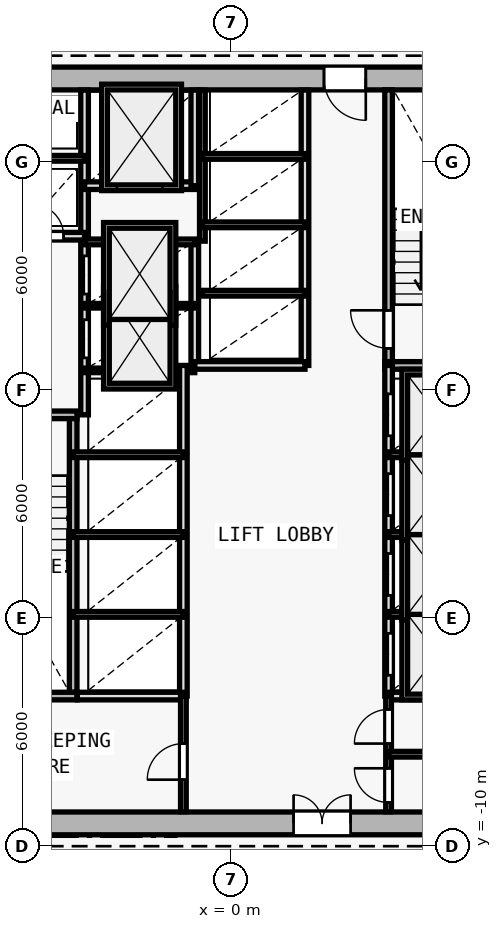
"""IFC4 building model, lengths in metres.
Left out: names, types, materials, properties, quantities, classifications, styles, units other than length and angle.
Written with IfcOpenShell. Run it as: python <this file> out.ifc"""

import sys

from ifc_helpers import new_model, si_unit, direction, frame, frame_2d, origin, origin_2d, place, context, subcontext, project, spatial, rectangle, i_section, extrude, element, fill, save


model = new_model("IFC4")
c1 = context("Model", 3, precision=1e-05, world=origin(), true_north=direction((0.0, 1.0)))
c2 = subcontext(c1, "Body", "Model", "MODEL_VIEW")
j1 = project(units=[si_unit("LENGTHUNIT", "METRE"), si_unit("PLANEANGLEUNIT", "RADIAN")], contexts=[c1])
p1 = place(None, origin())
s1 = spatial("IfcSite", under=j1, at=p1, CompositionType="ELEMENT")
p2 = place(p1, origin())
s2 = spatial("IfcBuilding", under=s1, at=p2, CompositionType="ELEMENT")
p3 = place(p2, frame((0.0, 0.0, 55.2)))
s3 = spatial("IfcBuildingStorey", under=s2, at=p3, CompositionType="ELEMENT", Elevation=55.2)
p4 = place(p3, frame((0.0, -9.4, 0.0), z_axis=(0.0, 0.0, 1.0), x_axis=(1.0, 0.0, 0.0)))
e1 = element("IfcColumn", 1, at=p4, inside=s3, PredefinedType="COLUMN", context=c2, shape_type="SweptSolid", body=[
    extrude(i_section(OverallWidth=0.416, OverallDepth=0.446, WebThickness=0.025, FlangeThickness=0.04, FilletRadius=0.015, at=origin_2d()), origin(), (0.0, 0.0, 1.0), 3.6),
])
p5 = place(p3, frame((-8.0, -9.4, 0.0), z_axis=(0.0, 0.0, 1.0), x_axis=(1.0, 0.0, 0.0)))
e2 = element("IfcWall", 2, at=p5, inside=s3, PredefinedType="SHEAR", context=c2, shape_type="SweptSolid", body=[
    extrude(rectangle(XDim=16.0, YDim=0.6, at=frame_2d((8.0, 0.0))), origin(), (0.0, 0.0, 1.0), 3.35),
])
p6 = place(p5, frame((9.65, 0.0, 0.0)))
e3 = element("IfcOpeningElement", 3, at=p6, cuts=e2, PredefinedType="OPENING", context=c2, shape_type="SweptSolid", body=[
    extrude(rectangle(XDim=1.5, YDim=2.2, at=frame_2d((0.75, 1.1))), frame((0.0, 0.31, 0.0), z_axis=(0.0, -1.0, 0.0), x_axis=(1.0, 0.0, 0.0)), (0.0, 0.0, 1.0), 0.62),
])
p7 = place(p3, frame((8.0, 10.2, 0.0), z_axis=(0.0, 0.0, 1.0), x_axis=(-1.0, 0.0, 0.0)))
e4 = element("IfcWall", 4, at=p7, inside=s3, PredefinedType="SHEAR", context=c2, shape_type="SweptSolid", body=[
    extrude(rectangle(XDim=16.0, YDim=0.6, at=frame_2d((8.0, 0.0))), origin(), (0.0, 0.0, 1.0), 3.35),
])
p8 = place(p7, frame((4.45, 0.0, 0.0)))
e5 = element("IfcOpeningElement", 5, at=p8, cuts=e4, PredefinedType="OPENING", context=c2, shape_type="SweptSolid", body=[
    extrude(rectangle(XDim=1.1, YDim=2.15, at=frame_2d((0.55, 1.075))), frame((0.0, 0.31, 0.0), z_axis=(0.0, -1.0, 0.0), x_axis=(1.0, 0.0, 0.0)), (0.0, 0.0, 1.0), 0.62),
])
p9 = place(p3, frame((-7.4, 1.35, 0.0), z_axis=(0.0, 0.0, 1.0), x_axis=(1.0, 0.0, 0.0)))
e6 = element("IfcWall", 6, at=p9, inside=s3, PredefinedType="SOLIDWALL", context=c2, shape_type="SweptSolid", body=[
    extrude(rectangle(XDim=3.35, YDim=0.2, at=frame_2d((1.675, 0.0))), origin(), (0.0, 0.0, 1.0), 3.35),
])
p10 = place(p9, frame((0.65, 0.0, 0.0)))
e7 = element("IfcOpeningElement", 7, at=p10, cuts=e6, PredefinedType="OPENING", context=c2, shape_type="SweptSolid", body=[
    extrude(rectangle(XDim=1.0, YDim=2.15, at=frame_2d((0.5, 1.075))), frame((0.0, 0.11, 0.0), z_axis=(0.0, -1.0, 0.0), x_axis=(1.0, 0.0, 0.0)), (0.0, 0.0, 1.0), 0.22),
])
p11 = place(p3, frame((-4.15, -5.95, 0.0), z_axis=(0.0, 0.0, 1.0), x_axis=(0.0, 1.0, 0.0)))
e8 = element("IfcWall", 8, at=p11, inside=s3, PredefinedType="SOLIDWALL", context=c2, shape_type="SweptSolid", body=[
    extrude(rectangle(XDim=7.2, YDim=0.2, at=frame_2d((3.6, 0.0))), origin(), (0.0, 0.0, 1.0), 3.35),
])
p12 = place(p3, frame((-3.85, 1.35, 0.0), z_axis=(0.0, 0.0, 1.0), x_axis=(0.0, 1.0, 0.0)))
e9 = element("IfcWall", 9, at=p12, inside=s3, PredefinedType="SOLIDWALL", context=c2, shape_type="SweptSolid", body=[
    extrude(rectangle(XDim=8.545, YDim=0.2, at=frame_2d((4.272, 0.0))), origin(), (0.0, 0.0, 1.0), 3.35),
])
p13 = place(p12, frame((1.5, 0.0, 0.0)))
e10 = element("IfcOpeningElement", 10, at=p13, cuts=e9, PredefinedType="OPENING", context=c2, shape_type="SweptSolid", body=[
    extrude(rectangle(XDim=1.0, YDim=2.15, at=frame_2d((0.5, 1.075))), frame((0.0, 0.11, 0.0), z_axis=(0.0, -1.0, 0.0), x_axis=(1.0, 0.0, 0.0)), (0.0, 0.0, 1.0), 0.22),
])
p14 = place(p12, frame((3.18, 0.0, 0.0)))
e11 = element("IfcOpeningElement", 11, at=p14, cuts=e9, PredefinedType="OPENING", context=c2, shape_type="SweptSolid", body=[
    extrude(rectangle(XDim=1.0, YDim=2.15, at=frame_2d((0.5, 1.075))), frame((0.0, 0.11, 0.0), z_axis=(0.0, -1.0, 0.0), x_axis=(1.0, 0.0, 0.0)), (0.0, 0.0, 1.0), 0.22),
])
p15 = place(p3, frame((-7.395, 6.05, 0.0), z_axis=(0.0, 0.0, 1.0), x_axis=(1.0, 0.0, 0.0)))
e12 = element("IfcWall", 12, at=p15, inside=s3, PredefinedType="SOLIDWALL", context=c2, shape_type="SweptSolid", body=[
    extrude(rectangle(XDim=3.545, YDim=0.2, at=frame_2d((1.772, 0.0))), origin(), (0.0, 0.0, 1.0), 3.35),
])
p16 = place(p15, frame((0.345, 0.0, 0.0)))
e13 = element("IfcOpeningElement", 13, at=p16, cuts=e12, PredefinedType="OPENING", context=c2, shape_type="SweptSolid", body=[
    extrude(rectangle(XDim=0.85, YDim=2.1, at=frame_2d((0.425, 1.05))), frame((0.0, 0.11, 0.0), z_axis=(0.0, -1.0, 0.0), x_axis=(1.0, 0.0, 0.0)), (0.0, 0.0, 1.0), 0.22),
])
p17 = place(p15, frame((2.145, 0.0, 0.0)))
e14 = element("IfcOpeningElement", 14, at=p17, cuts=e12, PredefinedType="OPENING", context=c2, shape_type="SweptSolid", body=[
    extrude(rectangle(XDim=0.85, YDim=2.1, at=frame_2d((0.425, 1.05))), frame((0.0, 0.11, 0.0), z_axis=(0.0, -1.0, 0.0), x_axis=(1.0, 0.0, 0.0)), (0.0, 0.0, 1.0), 0.22),
])
p18 = place(p3, frame((-7.395, 8.1, 0.0), z_axis=(0.0, 0.0, 1.0), x_axis=(1.0, 0.0, 0.0)))
e15 = element("IfcWall", 15, at=p18, inside=s3, PredefinedType="PARTITIONING", context=c2, shape_type="SweptSolid", body=[
    extrude(rectangle(XDim=3.545, YDim=0.15, at=frame_2d((1.772, 0.0))), origin(), (0.0, 0.0, 1.0), 3.35),
])
p19 = place(p3, frame((4.15, 2.75, 0.0), z_axis=(0.0, 0.0, 1.0), x_axis=(0.0, 1.0, 0.0)))
e16 = element("IfcWall", 16, at=p19, inside=s3, PredefinedType="SOLIDWALL", context=c2, shape_type="SweptSolid", body=[
    extrude(rectangle(XDim=7.15, YDim=0.2, at=frame_2d((3.575, 0.0))), origin(), (0.0, 0.0, 1.0), 3.35),
])
p20 = place(p19, frame((0.35, 0.0, 0.0)))
e17 = element("IfcOpeningElement", 17, at=p20, cuts=e16, PredefinedType="OPENING", context=c2, shape_type="SweptSolid", body=[
    extrude(rectangle(XDim=1.0, YDim=2.15, at=frame_2d((0.5, 1.075))), frame((0.0, 0.11, 0.0), z_axis=(0.0, -1.0, 0.0), x_axis=(1.0, 0.0, 0.0)), (0.0, 0.0, 1.0), 0.22),
])
p21 = place(p3, frame((4.05, 2.65, 0.0), z_axis=(0.0, 0.0, 1.0), x_axis=(1.0, 0.0, 0.0)))
e18 = element("IfcWall", 18, at=p21, inside=s3, PredefinedType="SOLIDWALL", context=c2, shape_type="SweptSolid", body=[
    extrude(rectangle(XDim=3.35, YDim=0.2, at=frame_2d((1.675, 0.0))), origin(), (0.0, 0.0, 1.0), 3.35),
])
p22 = place(p3, frame((-0.95, 2.65, 0.0), z_axis=(0.0, 0.0, 1.0), x_axis=(0.0, 1.0, 0.0)))
e19 = element("IfcWall", 19, at=p22, inside=s3, PredefinedType="SOLIDWALL", context=c2, shape_type="SweptSolid", body=[
    extrude(rectangle(XDim=3.27, YDim=0.2, at=frame_2d((1.635, 0.0))), origin(), (0.0, 0.0, 1.0), 3.35),
])
for number, where, z_axis, x_axis in (
    (20, (-3.85, 2.52, 0.0), (0.0, 0.0, 1.0), (1.0, 0.0, 0.0)),
    (21, (-3.85, 4.22, 0.0), (0.0, 0.0, 1.0), (1.0, 0.0, 0.0)),
):
    element("IfcWall", number, at=place(p3, frame(where, z_axis=z_axis, x_axis=x_axis)), inside=s3, PredefinedType="PARTITIONING", context=c2, shape_type="SweptSolid", body=[
        extrude(rectangle(XDim=2.9, YDim=0.12, at=frame_2d((1.45, 0.0))), origin(), (0.0, 0.0, 1.0), 3.35),
    ])
p23 = place(p3, frame((-3.85, 5.9, 0.0), z_axis=(0.0, 0.0, 1.0), x_axis=(1.0, 0.0, 0.0)))
e22 = element("IfcWall", 22, at=p23, inside=s3, PredefinedType="PARTITIONING", context=c2, shape_type="SweptSolid", body=[
    extrude(rectangle(XDim=2.9, YDim=0.15, at=frame_2d((1.45, 0.0))), origin(), (0.0, 0.0, 1.0), 3.35),
])
p24 = place(p3, frame((-3.85, 7.38, 0.0), z_axis=(0.0, 0.0, 1.0), x_axis=(1.0, 0.0, 0.0)))
e23 = element("IfcWall", 23, at=p24, inside=s3, PredefinedType="SOLIDWALL", context=c2, shape_type="SweptSolid", body=[
    extrude(rectangle(XDim=2.9, YDim=0.2, at=frame_2d((1.45, 0.0))), origin(), (0.0, 0.0, 1.0), 3.35),
])
p25 = place(p24, frame((0.85, 0.0, 0.0)))
e24 = element("IfcOpeningElement", 24, at=p25, cuts=e23, PredefinedType="OPENING", context=c2, shape_type="SweptSolid", body=[
    extrude(rectangle(XDim=1.2, YDim=2.2, at=frame_2d((0.6, 1.1))), frame((0.0, 0.11, 0.0), z_axis=(0.0, -1.0, 0.0), x_axis=(1.0, 0.0, 0.0)), (0.0, 0.0, 1.0), 0.22),
])
p26 = place(p3, frame((-0.95, 7.38, 0.0), z_axis=(0.0, 0.0, 1.0), x_axis=(0.0, 1.0, 0.0)))
e25 = element("IfcWall", 25, at=p26, inside=s3, PredefinedType="SOLIDWALL", context=c2, shape_type="SweptSolid", body=[
    extrude(rectangle(XDim=2.515, YDim=0.2, at=frame_2d((1.258, 0.0))), origin(), (0.0, 0.0, 1.0), 3.35),
])
p27 = place(p3, frame((4.15, -6.05, 0.0), z_axis=(0.0, 0.0, 1.0), x_axis=(0.0, 1.0, 0.0)))
e26 = element("IfcWall", 26, at=p27, inside=s3, PredefinedType="SOLIDWALL", context=c2, shape_type="SweptSolid", body=[
    extrude(rectangle(XDim=8.7, YDim=0.2, at=frame_2d((4.35, 0.0))), origin(), (0.0, 0.0, 1.0), 3.35),
])
p28 = place(p27, frame((0.55, 0.0, 0.0)))
e27 = element("IfcOpeningElement", 27, at=p28, cuts=e26, PredefinedType="OPENING", context=c2, shape_type="SweptSolid", body=[
    extrude(rectangle(XDim=1.1, YDim=2.15, at=frame_2d((0.55, 1.075))), frame((0.0, 0.11, 0.0), z_axis=(0.0, -1.0, 0.0), x_axis=(1.0, 0.0, 0.0)), (0.0, 0.0, 1.0), 0.22),
])
p29 = place(p27, frame((2.65, 0.0, 0.0)))
e28 = element("IfcOpeningElement", 28, at=p29, cuts=e26, PredefinedType="OPENING", context=c2, shape_type="SweptSolid", body=[
    extrude(rectangle(XDim=1.1, YDim=2.15, at=frame_2d((0.55, 1.075))), frame((0.0, 0.11, 0.0), z_axis=(0.0, -1.0, 0.0), x_axis=(1.0, 0.0, 0.0)), (0.0, 0.0, 1.0), 0.22),
])
p30 = place(p27, frame((4.75, 0.0, 0.0)))
e29 = element("IfcOpeningElement", 29, at=p30, cuts=e26, PredefinedType="OPENING", context=c2, shape_type="SweptSolid", body=[
    extrude(rectangle(XDim=1.1, YDim=2.15, at=frame_2d((0.55, 1.075))), frame((0.0, 0.11, 0.0), z_axis=(0.0, -1.0, 0.0), x_axis=(1.0, 0.0, 0.0)), (0.0, 0.0, 1.0), 0.22),
])
p31 = place(p27, frame((6.85, 0.0, 0.0)))
e30 = element("IfcOpeningElement", 30, at=p31, cuts=e26, PredefinedType="OPENING", context=c2, shape_type="SweptSolid", body=[
    extrude(rectangle(XDim=1.1, YDim=2.15, at=frame_2d((0.55, 1.075))), frame((0.0, 0.11, 0.0), z_axis=(0.0, -1.0, 0.0), x_axis=(1.0, 0.0, 0.0)), (0.0, 0.0, 1.0), 0.22),
])
for number, where, z_axis, x_axis in (
    (31, (4.15, -3.9, 0.0), (0.0, 0.0, 1.0), (1.0, 0.0, 0.0)),
    (32, (4.15, -1.8, 0.0), (0.0, 0.0, 1.0), (1.0, 0.0, 0.0)),
    (33, (4.15, 0.3, 0.0), (0.0, 0.0, 1.0), (1.0, 0.0, 0.0)),
):
    element("IfcWall", number, at=place(p3, frame(where, z_axis=z_axis, x_axis=x_axis)), inside=s3, PredefinedType="PARTITIONING", context=c2, shape_type="SweptSolid", body=[
        extrude(rectangle(XDim=2.6, YDim=0.15, at=frame_2d((1.3, 0.0))), origin(), (0.0, 0.0, 1.0), 3.35),
    ])
p32 = place(p3, frame((-1.25, -6.05, 0.0), z_axis=(0.0, 0.0, 1.0), x_axis=(0.0, 1.0, 0.0)))
e34 = element("IfcWall", 34, at=p32, inside=s3, PredefinedType="SOLIDWALL", context=c2, shape_type="SweptSolid", body=[
    extrude(rectangle(XDim=8.7, YDim=0.2, at=frame_2d((4.35, 0.0))), origin(), (0.0, 0.0, 1.0), 3.35),
])
for number, where, z_axis, x_axis in (
    (35, (-4.15, -3.9, 0.0), (0.0, 0.0, 1.0), (1.0, 0.0, 0.0)),
    (36, (-4.15, -1.8, 0.0), (0.0, 0.0, 1.0), (1.0, 0.0, 0.0)),
    (37, (-4.15, 0.3, 0.0), (0.0, 0.0, 1.0), (1.0, 0.0, 0.0)),
):
    element("IfcWall", number, at=place(p3, frame(where, z_axis=z_axis, x_axis=x_axis)), inside=s3, PredefinedType="PARTITIONING", context=c2, shape_type="SweptSolid", body=[
        extrude(rectangle(XDim=2.9, YDim=0.15, at=frame_2d((1.45, 0.0))), origin(), (0.0, 0.0, 1.0), 3.35),
    ])
p33 = place(p3, frame((1.95, 2.65, 0.0), z_axis=(0.0, 0.0, 1.0), x_axis=(0.0, 1.0, 0.0)))
e38 = element("IfcWall", 38, at=p33, inside=s3, PredefinedType="SOLIDWALL", context=c2, shape_type="SweptSolid", body=[
    extrude(rectangle(XDim=7.245, YDim=0.2, at=frame_2d((3.623, 0.0))), origin(), (0.0, 0.0, 1.0), 3.35),
])
p34 = place(p3, frame((-0.95, 2.65, 0.0), z_axis=(0.0, 0.0, 1.0), x_axis=(1.0, 0.0, 0.0)))
e39 = element("IfcWall", 39, at=p34, inside=s3, PredefinedType="SOLIDWALL", context=c2, shape_type="SweptSolid", body=[
    extrude(rectangle(XDim=2.9, YDim=0.2, at=frame_2d((1.45, 0.0))), origin(), (0.0, 0.0, 1.0), 3.35),
])
p35 = place(p3, frame((-0.75, 5.92, 0.0), z_axis=(0.0, 0.0, 1.0), x_axis=(0.0, 1.0, 0.0)))
e40 = element("IfcWall", 40, at=p35, inside=s3, PredefinedType="PARTITIONING", context=c2, shape_type="SweptSolid", body=[
    extrude(rectangle(XDim=3.975, YDim=0.15, at=frame_2d((1.988, 0.0))), origin(), (0.0, 0.0, 1.0), 3.35),
])
for number, where, z_axis, x_axis in (
    (41, (-0.75, 4.55, 0.0), (0.0, 0.0, 1.0), (1.0, 0.0, 0.0)),
    (42, (-0.75, 6.35, 0.0), (0.0, 0.0, 1.0), (1.0, 0.0, 0.0)),
    (43, (-0.75, 8.15, 0.0), (0.0, 0.0, 1.0), (1.0, 0.0, 0.0)),
):
    element("IfcWall", number, at=place(p3, frame(where, z_axis=z_axis, x_axis=x_axis)), inside=s3, PredefinedType="PARTITIONING", context=c2, shape_type="SweptSolid", body=[
        extrude(rectangle(XDim=2.7, YDim=0.15, at=frame_2d((1.35, 0.0))), origin(), (0.0, 0.0, 1.0), 3.35),
    ])
p36 = place(p3, frame((-7.4, -6.05, 0.0), z_axis=(0.0, 0.0, 1.0), x_axis=(1.0, 0.0, 0.0)))
e44 = element("IfcWall", 44, at=p36, inside=s3, PredefinedType="SOLIDWALL", context=c2, shape_type="SweptSolid", body=[
    extrude(rectangle(XDim=3.35, YDim=0.2, at=frame_2d((1.675, 0.0))), origin(), (0.0, 0.0, 1.0), 3.35),
])
p37 = place(p3, frame((-4.04, -6.05, 0.0), z_axis=(0.0, 0.0, 1.0), x_axis=(1.0, 0.0, 0.0)))
e45 = element("IfcWall", 45, at=p37, inside=s3, PredefinedType="SOLIDWALL", context=c2, shape_type="SweptSolid", body=[
    extrude(rectangle(XDim=2.79, YDim=0.2, at=frame_2d((1.395, 0.0))), origin(), (0.0, 0.0, 1.0), 3.35),
])
p38 = place(p3, frame((4.15, -6.05, 0.0), z_axis=(0.0, 0.0, 1.0), x_axis=(1.0, 0.0, 0.0)))
e46 = element("IfcWall", 46, at=p38, inside=s3, PredefinedType="SOLIDWALL", context=c2, shape_type="SweptSolid", body=[
    extrude(rectangle(XDim=3.245, YDim=0.2, at=frame_2d((1.623, 0.0))), origin(), (0.0, 0.0, 1.0), 3.35),
])
p39 = place(p3, frame((-1.25, -9.095, 0.0), z_axis=(0.0, 0.0, 1.0), x_axis=(0.0, 1.0, 0.0)))
e47 = element("IfcWall", 47, at=p39, inside=s3, PredefinedType="PARTITIONING", context=c2, shape_type="SweptSolid", body=[
    extrude(rectangle(XDim=3.045, YDim=0.15, at=frame_2d((1.522, 0.0))), origin(), (0.0, 0.0, 1.0), 3.35),
])
p40 = place(p39, frame((0.845, 0.0, 0.0)))
e48 = element("IfcOpeningElement", 48, at=p40, cuts=e47, PredefinedType="OPENING", context=c2, shape_type="SweptSolid", body=[
    extrude(rectangle(XDim=0.95, YDim=2.1, at=frame_2d((0.475, 1.05))), frame((0.0, 0.085, 0.0), z_axis=(0.0, -1.0, 0.0), x_axis=(1.0, 0.0, 0.0)), (0.0, 0.0, 1.0), 0.17),
])
p41 = place(p3, frame((4.15, -9.095, 0.0), z_axis=(0.0, 0.0, 1.0), x_axis=(0.0, 1.0, 0.0)))
e49 = element("IfcWall", 49, at=p41, inside=s3, PredefinedType="PARTITIONING", context=c2, shape_type="SweptSolid", body=[
    extrude(rectangle(XDim=3.045, YDim=0.15, at=frame_2d((1.522, 0.0))), origin(), (0.0, 0.0, 1.0), 3.35),
])
p42 = place(p41, frame((0.245, 0.0, 0.0)))
e50 = element("IfcOpeningElement", 50, at=p42, cuts=e49, PredefinedType="OPENING", context=c2, shape_type="SweptSolid", body=[
    extrude(rectangle(XDim=0.9, YDim=2.1, at=frame_2d((0.45, 1.05))), frame((0.0, 0.085, 0.0), z_axis=(0.0, -1.0, 0.0), x_axis=(1.0, 0.0, 0.0)), (0.0, 0.0, 1.0), 0.17),
])
p43 = place(p41, frame((1.795, 0.0, 0.0)))
e51 = element("IfcOpeningElement", 51, at=p43, cuts=e49, PredefinedType="OPENING", context=c2, shape_type="SweptSolid", body=[
    extrude(rectangle(XDim=0.9, YDim=2.1, at=frame_2d((0.45, 1.05))), frame((0.0, 0.085, 0.0), z_axis=(0.0, -1.0, 0.0), x_axis=(1.0, 0.0, 0.0)), (0.0, 0.0, 1.0), 0.17),
])
p44 = place(p3, frame((4.15, -7.58, 0.0), z_axis=(0.0, 0.0, 1.0), x_axis=(1.0, 0.0, 0.0)))
e52 = element("IfcWall", 52, at=p44, inside=s3, PredefinedType="PARTITIONING", context=c2, shape_type="SweptSolid", body=[
    extrude(rectangle(XDim=3.245, YDim=0.15, at=frame_2d((1.623, 0.0))), origin(), (0.0, 0.0, 1.0), 3.35),
])
p45 = place(p6, origin())
e53 = element("IfcDoor", 53, at=p45, inside=s3, OperationType="DOUBLE_DOOR_SINGLE_SWING", PredefinedType="DOOR", context=c2, shape_type="SweptSolid", body=[
    extrude(rectangle(XDim=1.5, YDim=2.2, at=frame_2d((0.75, 1.1))), frame((0.0, 0.025, 0.0), z_axis=(0.0, -1.0, 0.0), x_axis=(1.0, 0.0, 0.0)), (0.0, 0.0, 1.0), 0.05),
])
fill(e3, e53)
p46 = place(p8, origin())
e54 = element("IfcDoor", 54, at=p46, inside=s3, OperationType="SINGLE_SWING_LEFT", PredefinedType="DOOR", context=c2, shape_type="SweptSolid", body=[
    extrude(rectangle(XDim=1.1, YDim=2.15, at=frame_2d((0.55, 1.075))), frame((0.0, 0.025, 0.0), z_axis=(0.0, -1.0, 0.0), x_axis=(1.0, 0.0, 0.0)), (0.0, 0.0, 1.0), 0.05),
])
fill(e5, e54)
p47 = place(p17, origin())
e55 = element("IfcDoor", 55, at=p47, inside=s3, OperationType="SINGLE_SWING_LEFT", PredefinedType="DOOR", context=c2, shape_type="SweptSolid", body=[
    extrude(rectangle(XDim=0.85, YDim=2.1, at=frame_2d((0.425, 1.05))), frame((0.0, 0.025, 0.0), z_axis=(0.0, -1.0, 0.0), x_axis=(1.0, 0.0, 0.0)), (0.0, 0.0, 1.0), 0.05),
])
fill(e14, e55)
p48 = place(p20, origin())
e56 = element("IfcDoor", 56, at=p48, inside=s3, OperationType="SINGLE_SWING_RIGHT", PredefinedType="DOOR", context=c2, shape_type="SweptSolid", body=[
    extrude(rectangle(XDim=1.0, YDim=2.15, at=frame_2d((0.5, 1.075))), frame((0.0, 0.025, 0.0), z_axis=(0.0, -1.0, 0.0), x_axis=(1.0, 0.0, 0.0)), (0.0, 0.0, 1.0), 0.05),
])
fill(e17, e56)
p49 = place(p25, origin())
e57 = element("IfcDoor", 57, at=p49, inside=s3, OperationType="DOUBLE_DOOR_SLIDING", PredefinedType="DOOR", context=c2, shape_type="SweptSolid", body=[
    extrude(rectangle(XDim=1.2, YDim=2.2, at=frame_2d((0.6, 1.1))), frame((0.0, 0.025, 0.0), z_axis=(0.0, -1.0, 0.0), x_axis=(1.0, 0.0, 0.0)), (0.0, 0.0, 1.0), 0.05),
])
fill(e24, e57)
p50 = place(p28, origin())
e58 = element("IfcDoor", 58, at=p50, inside=s3, OperationType="DOUBLE_DOOR_SLIDING", PredefinedType="DOOR", context=c2, shape_type="SweptSolid", body=[
    extrude(rectangle(XDim=1.1, YDim=2.15, at=frame_2d((0.55, 1.075))), frame((0.0, 0.025, 0.0), z_axis=(0.0, -1.0, 0.0), x_axis=(1.0, 0.0, 0.0)), (0.0, 0.0, 1.0), 0.05),
])
fill(e27, e58)
p51 = place(p29, origin())
e59 = element("IfcDoor", 59, at=p51, inside=s3, OperationType="DOUBLE_DOOR_SLIDING", PredefinedType="DOOR", context=c2, shape_type="SweptSolid", body=[
    extrude(rectangle(XDim=1.1, YDim=2.15, at=frame_2d((0.55, 1.075))), frame((0.0, 0.025, 0.0), z_axis=(0.0, -1.0, 0.0), x_axis=(1.0, 0.0, 0.0)), (0.0, 0.0, 1.0), 0.05),
])
fill(e28, e59)
p52 = place(p30, origin())
e60 = element("IfcDoor", 60, at=p52, inside=s3, OperationType="DOUBLE_DOOR_SLIDING", PredefinedType="DOOR", context=c2, shape_type="SweptSolid", body=[
    extrude(rectangle(XDim=1.1, YDim=2.15, at=frame_2d((0.55, 1.075))), frame((0.0, 0.025, 0.0), z_axis=(0.0, -1.0, 0.0), x_axis=(1.0, 0.0, 0.0)), (0.0, 0.0, 1.0), 0.05),
])
fill(e29, e60)
p53 = place(p31, origin())
e61 = element("IfcDoor", 61, at=p53, inside=s3, OperationType="DOUBLE_DOOR_SLIDING", PredefinedType="DOOR", context=c2, shape_type="SweptSolid", body=[
    extrude(rectangle(XDim=1.1, YDim=2.15, at=frame_2d((0.55, 1.075))), frame((0.0, 0.025, 0.0), z_axis=(0.0, -1.0, 0.0), x_axis=(1.0, 0.0, 0.0)), (0.0, 0.0, 1.0), 0.05),
])
fill(e30, e61)
p54 = place(p13, origin())
e62 = element("IfcDoor", 62, at=p54, inside=s3, OperationType="DOUBLE_DOOR_SLIDING", PredefinedType="DOOR", context=c2, shape_type="SweptSolid", body=[
    extrude(rectangle(XDim=1.0, YDim=2.15, at=frame_2d((0.5, 1.075))), frame((0.0, 0.025, 0.0), z_axis=(0.0, -1.0, 0.0), x_axis=(1.0, 0.0, 0.0)), (0.0, 0.0, 1.0), 0.05),
])
fill(e10, e62)
p55 = place(p14, origin())
e63 = element("IfcDoor", 63, at=p55, inside=s3, OperationType="DOUBLE_DOOR_SLIDING", PredefinedType="DOOR", context=c2, shape_type="SweptSolid", body=[
    extrude(rectangle(XDim=1.0, YDim=2.15, at=frame_2d((0.5, 1.075))), frame((0.0, 0.025, 0.0), z_axis=(0.0, -1.0, 0.0), x_axis=(1.0, 0.0, 0.0)), (0.0, 0.0, 1.0), 0.05),
])
fill(e11, e63)
p56 = place(p40, origin())
e64 = element("IfcDoor", 64, at=p56, inside=s3, OperationType="SINGLE_SWING_LEFT", PredefinedType="DOOR", context=c2, shape_type="SweptSolid", body=[
    extrude(rectangle(XDim=0.95, YDim=2.1, at=frame_2d((0.475, 1.05))), frame((0.0, 0.025, 0.0), z_axis=(0.0, -1.0, 0.0), x_axis=(1.0, 0.0, 0.0)), (0.0, 0.0, 1.0), 0.05),
])
fill(e48, e64)
p57 = place(p42, origin())
e65 = element("IfcDoor", 65, at=p57, inside=s3, OperationType="SINGLE_SWING_RIGHT", PredefinedType="DOOR", context=c2, shape_type="SweptSolid", body=[
    extrude(rectangle(XDim=0.9, YDim=2.1, at=frame_2d((0.45, 1.05))), frame((0.0, 0.025, 0.0), z_axis=(0.0, -1.0, 0.0), x_axis=(1.0, 0.0, 0.0)), (0.0, 0.0, 1.0), 0.05),
])
fill(e50, e65)
p58 = place(p43, origin())
e66 = element("IfcDoor", 66, at=p58, inside=s3, OperationType="SINGLE_SWING_LEFT", PredefinedType="DOOR", context=c2, shape_type="SweptSolid", body=[
    extrude(rectangle(XDim=0.9, YDim=2.1, at=frame_2d((0.45, 1.05))), frame((0.0, 0.025, 0.0), z_axis=(0.0, -1.0, 0.0), x_axis=(1.0, 0.0, 0.0)), (0.0, 0.0, 1.0), 0.05),
])
fill(e51, e66)
save(model, sys.argv[1])
